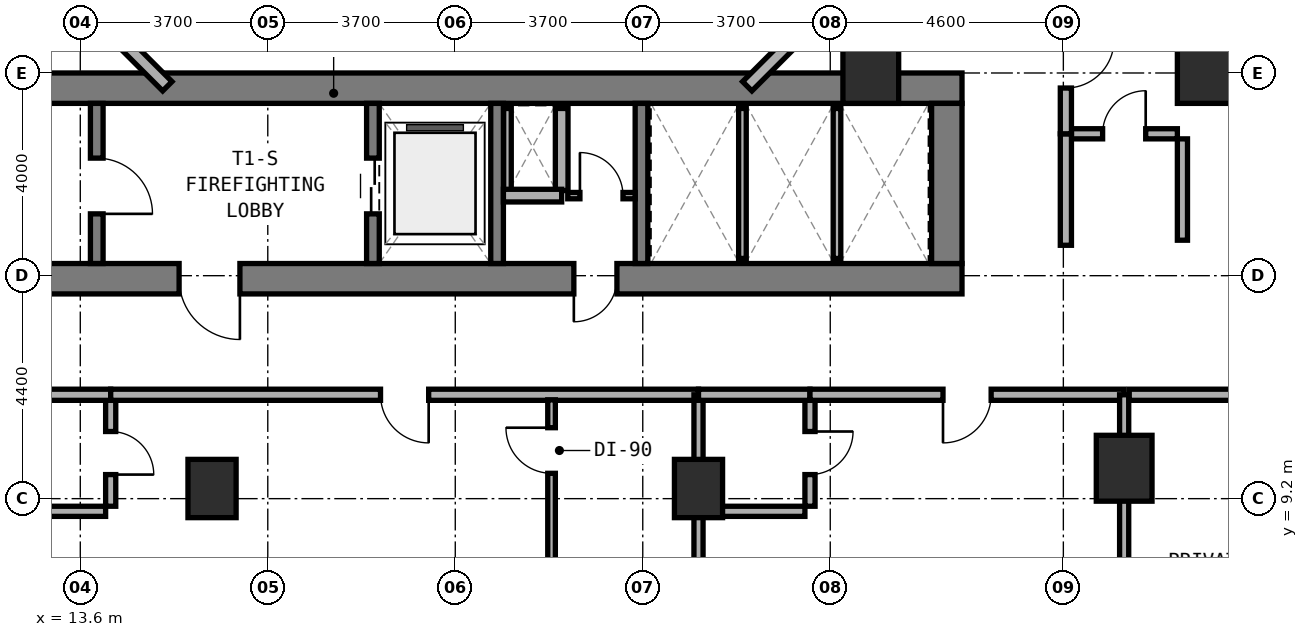
"""IFC4 building model, lengths in metres.
Left out: names, types, materials, properties, quantities, classifications, styles, units other than length and angle.
Written with IfcOpenShell. Run it as: python <this file> out.ifc"""

import sys

from ifc_helpers import new_model, si_unit, direction, frame, frame_2d, origin, origin_2d, place, context, subcontext, project, spatial, rectangle, extrude, element, fill, save


model = new_model("IFC4")
c1 = context("Model", 3, precision=1e-05, world=origin(), true_north=direction((0.0, 1.0)))
c2 = subcontext(c1, "Body", "Model", "MODEL_VIEW")
j1 = project(units=[si_unit("LENGTHUNIT", "METRE"), si_unit("PLANEANGLEUNIT", "RADIAN")], contexts=[c1])
p1 = place(None, origin())
s1 = spatial("IfcSite", under=j1, at=p1, CompositionType="ELEMENT")
p2 = place(p1, origin())
s2 = spatial("IfcBuilding", under=s1, at=p2, CompositionType="ELEMENT")
p3 = place(p2, frame((0.0, 0.0, 38.0)))
s3 = spatial("IfcBuildingStorey", under=s2, at=p3, CompositionType="ELEMENT", Elevation=38.0)
p4 = place(p3, frame((6.2, 13.54, 0.0), z_axis=(0.0, 0.0, 1.0), x_axis=(1.0, 0.0, 0.0)))
e1 = element("IfcWall", 1, at=p4, inside=s3, PredefinedType="SHEAR", context=c2, shape_type="SweptSolid", body=[
    extrude(rectangle(XDim=24.8, YDim=0.6, at=frame_2d((12.4, 0.0))), origin(), (0.0, 0.0, 1.0), 3.5),
])
p5 = place(p4, frame((9.35, 0.0, 0.0)))
e2 = element("IfcOpeningElement", 2, at=p5, cuts=e1, PredefinedType="OPENING", context=c2, shape_type="SweptSolid", body=[
    extrude(rectangle(XDim=1.2, YDim=2.15, at=frame_2d((0.6, 1.075))), frame((0.0, 0.31, 0.0), z_axis=(0.0, -1.0, 0.0), x_axis=(1.0, 0.0, 0.0)), (0.0, 0.0, 1.0), 0.62),
])
p6 = place(p4, frame((17.14, 0.0, 0.0)))
e3 = element("IfcOpeningElement", 3, at=p6, cuts=e1, PredefinedType="OPENING", context=c2, shape_type="SweptSolid", body=[
    extrude(rectangle(XDim=0.85, YDim=2.1, at=frame_2d((0.425, 1.05))), frame((0.0, 0.31, 0.0), z_axis=(0.0, -1.0, 0.0), x_axis=(1.0, 0.0, 0.0)), (0.0, 0.0, 1.0), 0.62),
])
p7 = place(p3, frame((6.2, 17.3, 0.0), z_axis=(0.0, 0.0, 1.0), x_axis=(1.0, 0.0, 0.0)))
e4 = element("IfcWall", 4, at=p7, inside=s3, PredefinedType="SHEAR", context=c2, shape_type="SweptSolid", body=[
    extrude(rectangle(XDim=24.8, YDim=0.6, at=frame_2d((12.4, 0.0))), origin(), (0.0, 0.0, 1.0), 3.5),
])
p8 = place(p3, frame((30.7, 13.84, 0.0), z_axis=(0.0, 0.0, 1.0), x_axis=(0.0, 1.0, 0.0)))
e5 = element("IfcWall", 5, at=p8, inside=s3, PredefinedType="SHEAR", context=c2, shape_type="SweptSolid", body=[
    extrude(rectangle(XDim=3.16, YDim=0.6, at=frame_2d((1.58, 0.0))), origin(), (0.0, 0.0, 1.0), 3.5),
])
p9 = place(p3, frame((13.925, 13.84, 0.0), z_axis=(0.0, 0.0, 1.0), x_axis=(0.0, 1.0, 0.0)))
e6 = element("IfcWall", 6, at=p9, inside=s3, PredefinedType="STANDARD", context=c2, shape_type="SweptSolid", body=[
    extrude(rectangle(XDim=3.16, YDim=0.25, at=frame_2d((1.58, 0.0))), origin(), (0.0, 0.0, 1.0), 3.22),
])
p10 = place(p9, frame((0.98, 0.0, 0.0)))
e7 = element("IfcOpeningElement", 7, at=p10, cuts=e6, PredefinedType="OPENING", context=c2, shape_type="SweptSolid", body=[
    extrude(rectangle(XDim=1.1, YDim=2.15, at=frame_2d((0.55, 1.075))), frame((0.0, 0.135, 0.0), z_axis=(0.0, -1.0, 0.0), x_axis=(1.0, 0.0, 0.0)), (0.0, 0.0, 1.0), 0.27),
])
p11 = place(p3, frame((19.375, 13.84, 0.0), z_axis=(0.0, 0.0, 1.0), x_axis=(0.0, 1.0, 0.0)))
e8 = element("IfcWall", 8, at=p11, inside=s3, PredefinedType="STANDARD", context=c2, shape_type="SweptSolid", body=[
    extrude(rectangle(XDim=3.16, YDim=0.25, at=frame_2d((1.58, 0.0))), origin(), (0.0, 0.0, 1.0), 3.22),
])
p12 = place(p11, frame((0.98, 0.0, 0.0)))
e9 = element("IfcOpeningElement", 9, at=p12, cuts=e8, PredefinedType="OPENING", context=c2, shape_type="SweptSolid", body=[
    extrude(rectangle(XDim=1.1, YDim=2.15, at=frame_2d((0.55, 1.075))), frame((0.0, 0.135, 0.0), z_axis=(0.0, -1.0, 0.0), x_axis=(1.0, 0.0, 0.0)), (0.0, 0.0, 1.0), 0.27),
])
for number, where, z_axis, x_axis in (
    (10, (21.825, 13.84, 0.0), (0.0, 0.0, 1.0), (0.0, 1.0, 0.0)),
    (11, (24.675, 13.84, 0.0), (0.0, 0.0, 1.0), (0.0, 1.0, 0.0)),
):
    element("IfcWall", number, at=place(p3, frame(where, z_axis=z_axis, x_axis=x_axis)), inside=s3, PredefinedType="STANDARD", context=c2, shape_type="SweptSolid", body=[
        extrude(rectangle(XDim=3.16, YDim=0.25, at=frame_2d((1.58, 0.0))), origin(), (0.0, 0.0, 1.0), 3.22),
    ])
for number, where, z_axis, x_axis in (
    (12, (16.2, 9.4, 0.0), (0.0, 0.0, 1.0), (1.0, 0.0, 0.0)),
    (13, (25.8, 9.4, 0.0), (0.0, 0.0, 1.0), (1.0, 0.0, 0.0)),
):
    element("IfcColumn", number, at=place(p3, frame(where, z_axis=z_axis, x_axis=x_axis)), inside=s3, PredefinedType="COLUMN", context=c2, shape_type="SweptSolid", body=[
        extrude(rectangle(XDim=0.95, YDim=1.15, at=origin_2d()), origin(), (0.0, 0.0, 1.0), 3.5),
    ])
for number, where, z_axis, x_axis in (
    (14, (34.2, 9.8, 0.0), (0.0, 0.0, 1.0), (1.0, 0.0, 0.0)),
    (15, (35.8, 17.65, 0.0), (0.0, 0.0, 1.0), (1.0, 0.0, 0.0)),
    (16, (29.2, 17.65, 0.0), (0.0, 0.0, 1.0), (1.0, 0.0, 0.0)),
):
    element("IfcColumn", number, at=place(p3, frame(where, z_axis=z_axis, x_axis=x_axis)), inside=s3, PredefinedType="COLUMN", context=c2, shape_type="SweptSolid", body=[
        extrude(rectangle(XDim=1.1, YDim=1.3, at=origin_2d()), origin(), (0.0, 0.0, 1.0), 3.5),
    ])
p13 = place(p3, frame((26.762, 17.338, 0.0), z_axis=(0.0, 0.0, 1.0), x_axis=(0.707059717605, 0.707153841636, 0.0)))
e17 = element("IfcWall", 17, at=p13, inside=s3, PredefinedType="STANDARD", context=c2, shape_type="SweptSolid", body=[
    extrude(rectangle(XDim=2.594, YDim=0.26, at=frame_2d((1.297, 0.0))), origin(), (0.0, 0.0, 1.0), 3.22),
])
p14 = place(p3, frame((13.484, 19.172, 0.0), z_axis=(0.0, 0.0, 1.0), x_axis=(0.707106781187, -0.707106781187, 0.0)))
e18 = element("IfcWall", 18, at=p14, inside=s3, PredefinedType="STANDARD", context=c2, shape_type="SweptSolid", body=[
    extrude(rectangle(XDim=2.594, YDim=0.26, at=frame_2d((1.297, 0.0))), origin(), (0.0, 0.0, 1.0), 3.22),
])
p15 = place(p3, frame((22.03, 15.28, 0.0), z_axis=(0.0, 0.0, 1.0), x_axis=(0.0, 1.0, 0.0)))
e19 = element("IfcWall", 19, at=p15, inside=s3, PredefinedType="PARTITIONING", context=c2, shape_type="SweptSolid", body=[
    extrude(rectangle(XDim=1.62, YDim=0.15, at=frame_2d((0.81, 0.0))), origin(), (0.0, 0.0, 1.0), 3.22),
])
p16 = place(p3, frame((23.1, 15.28, 0.0), z_axis=(0.0, 0.0, 1.0), x_axis=(0.0, 1.0, 0.0)))
e20 = element("IfcWall", 20, at=p16, inside=s3, PredefinedType="SOLIDWALL", context=c2, shape_type="SweptSolid", body=[
    extrude(rectangle(XDim=1.62, YDim=0.25, at=frame_2d((0.81, 0.0))), origin(), (0.0, 0.0, 1.0), 3.22),
])
p17 = place(p3, frame((21.95, 15.18, 0.0), z_axis=(0.0, 0.0, 1.0), x_axis=(1.0, 0.0, 0.0)))
e21 = element("IfcWall", 21, at=p17, inside=s3, PredefinedType="SOLIDWALL", context=c2, shape_type="SweptSolid", body=[
    extrude(rectangle(XDim=1.15, YDim=0.25, at=frame_2d((0.575, 0.0))), origin(), (0.0, 0.0, 1.0), 3.22),
])
p18 = place(p3, frame((23.22, 15.18, 0.0), z_axis=(0.0, 0.0, 1.0), x_axis=(1.0, 0.0, 0.0)))
e22 = element("IfcWall", 22, at=p18, inside=s3, PredefinedType="PARTITIONING", context=c2, shape_type="SweptSolid", body=[
    extrude(rectangle(XDim=1.33, YDim=0.125, at=frame_2d((0.665, 0.0))), origin(), (0.0, 0.0, 1.0), 3.22),
])
p19 = place(p18, frame((0.24, 0.0, 0.0)))
e23 = element("IfcOpeningElement", 23, at=p19, cuts=e22, PredefinedType="OPENING", context=c2, shape_type="SweptSolid", body=[
    extrude(rectangle(XDim=0.85, YDim=2.1, at=frame_2d((0.425, 1.05))), frame((0.0, 0.073, 0.0), z_axis=(0.0, -1.0, 0.0), x_axis=(1.0, 0.0, 0.0)), (0.0, 0.0, 1.0), 0.145),
])
p20 = place(p3, frame((26.667, 13.94, 0.0), z_axis=(0.0, 0.0, 1.0), x_axis=(0.0, 1.0, 0.0)))
e24 = element("IfcWall", 24, at=p20, inside=s3, PredefinedType="PARTITIONING", context=c2, shape_type="SweptSolid", body=[
    extrude(rectangle(XDim=2.96, YDim=0.15, at=frame_2d((1.48, 0.0))), origin(), (0.0, 0.0, 1.0), 3.22),
])
p21 = place(p3, frame((28.533, 13.94, 0.0), z_axis=(0.0, 0.0, 1.0), x_axis=(0.0, 1.0, 0.0)))
e25 = element("IfcWall", 25, at=p21, inside=s3, PredefinedType="PARTITIONING", context=c2, shape_type="SweptSolid", body=[
    extrude(rectangle(XDim=2.96, YDim=0.15, at=frame_2d((1.48, 0.0))), origin(), (0.0, 0.0, 1.0), 2.395),
])
p22 = place(p3, frame((14.2, 9.05, 0.0), z_axis=(0.0, 0.0, 1.0), x_axis=(0.0, 1.0, 0.0)))
e26 = element("IfcWall", 26, at=p22, inside=s3, PredefinedType="PLUMBINGWALL", context=c2, shape_type="SweptSolid", body=[
    extrude(rectangle(XDim=2.1, YDim=0.2, at=frame_2d((1.05, 0.0))), origin(), (0.0, 0.0, 1.0), 2.745),
])
p23 = place(p22, frame((0.625, 0.0, 0.0)))
e27 = element("IfcOpeningElement", 27, at=p23, cuts=e26, PredefinedType="OPENING", context=c2, shape_type="SweptSolid", body=[
    extrude(rectangle(XDim=0.85, YDim=2.1, at=frame_2d((0.425, 1.05))), frame((0.0, 0.11, 0.0), z_axis=(0.0, -1.0, 0.0), x_axis=(1.0, 0.0, 0.0)), (0.0, 0.0, 1.0), 0.22),
])
p24 = place(p3, frame((12.1, 8.95, 0.0), z_axis=(0.0, 0.0, 1.0), x_axis=(1.0, 0.0, 0.0)))
e28 = element("IfcWall", 28, at=p24, inside=s3, PredefinedType="PLUMBINGWALL", context=c2, shape_type="SweptSolid", body=[
    extrude(rectangle(XDim=2.0, YDim=0.2, at=frame_2d((1.0, 0.0))), origin(), (0.0, 0.0, 1.0), 3.22),
])
p25 = place(p3, frame((12.0, 11.25, 0.0), z_axis=(0.0, 0.0, 1.0), x_axis=(1.0, 0.0, 0.0)))
e29 = element("IfcWall", 29, at=p25, inside=s3, PredefinedType="SOLIDWALL", context=c2, shape_type="SweptSolid", body=[
    extrude(rectangle(XDim=2.2, YDim=0.22, at=frame_2d((1.1, 0.0))), origin(), (0.0, 0.0, 1.0), 2.865),
])
p26 = place(p3, frame((14.2, 11.25, 0.0), z_axis=(0.0, 0.0, 1.0), x_axis=(1.0, 0.0, 0.0)))
e30 = element("IfcWall", 30, at=p26, inside=s3, PredefinedType="SOLIDWALL", context=c2, shape_type="SweptSolid", body=[
    extrude(rectangle(XDim=11.6, YDim=0.22, at=frame_2d((5.8, 0.0))), origin(), (0.0, 0.0, 1.0), 2.395),
])
p27 = place(p26, frame((5.325, 0.0, 0.0)))
e31 = element("IfcOpeningElement", 31, at=p27, cuts=e30, PredefinedType="OPENING", context=c2, shape_type="SweptSolid", body=[
    extrude(rectangle(XDim=0.95, YDim=2.1, at=frame_2d((0.475, 1.05))), frame((0.0, 0.12, 0.0), z_axis=(0.0, -1.0, 0.0), x_axis=(1.0, 0.0, 0.0)), (0.0, 0.0, 1.0), 0.24),
])
p28 = place(p3, frame((22.9, 3.16, 0.0), z_axis=(0.0, 0.0, 1.0), x_axis=(0.0, 1.0, 0.0)))
e32 = element("IfcWall", 32, at=p28, inside=s3, PredefinedType="PARTITIONING", context=c2, shape_type="SweptSolid", body=[
    extrude(rectangle(XDim=7.99, YDim=0.15, at=frame_2d((3.995, 0.0))), origin(), (0.0, 0.0, 1.0), 2.745),
])
p29 = place(p28, frame((6.54, 0.0, 0.0)))
e33 = element("IfcOpeningElement", 33, at=p29, cuts=e32, PredefinedType="OPENING", context=c2, shape_type="SweptSolid", body=[
    extrude(rectangle(XDim=0.9, YDim=2.1, at=frame_2d((0.45, 1.05))), frame((0.0, 0.085, 0.0), z_axis=(0.0, -1.0, 0.0), x_axis=(1.0, 0.0, 0.0)), (0.0, 0.0, 1.0), 0.17),
])
p30 = place(p3, frame((25.8, 3.06, 0.0), z_axis=(0.0, 0.0, 1.0), x_axis=(0.0, 1.0, 0.0)))
e34 = element("IfcWall", 34, at=p30, inside=s3, PredefinedType="SOLIDWALL", context=c2, shape_type="SweptSolid", body=[
    extrude(rectangle(XDim=8.19, YDim=0.18, at=frame_2d((4.095, 0.0))), origin(), (0.0, 0.0, 1.0), 2.395),
])
p31 = place(p3, frame((28.0, 9.05, 0.0), z_axis=(0.0, 0.0, 1.0), x_axis=(0.0, 1.0, 0.0)))
e35 = element("IfcWall", 35, at=p31, inside=s3, PredefinedType="PLUMBINGWALL", context=c2, shape_type="SweptSolid", body=[
    extrude(rectangle(XDim=2.1, YDim=0.2, at=frame_2d((1.05, 0.0))), origin(), (0.0, 0.0, 1.0), 2.745),
])
p32 = place(p31, frame((0.625, 0.0, 0.0)))
e36 = element("IfcOpeningElement", 36, at=p32, cuts=e35, PredefinedType="OPENING", context=c2, shape_type="SweptSolid", body=[
    extrude(rectangle(XDim=0.85, YDim=2.1, at=frame_2d((0.425, 1.05))), frame((0.0, 0.11, 0.0), z_axis=(0.0, -1.0, 0.0), x_axis=(1.0, 0.0, 0.0)), (0.0, 0.0, 1.0), 0.22),
])
p33 = place(p3, frame((25.9, 8.95, 0.0), z_axis=(0.0, 0.0, 1.0), x_axis=(1.0, 0.0, 0.0)))
e37 = element("IfcWall", 37, at=p33, inside=s3, PredefinedType="PLUMBINGWALL", context=c2, shape_type="SweptSolid", body=[
    extrude(rectangle(XDim=2.0, YDim=0.2, at=frame_2d((1.0, 0.0))), origin(), (0.0, 0.0, 1.0), 3.22),
])
p34 = place(p3, frame((25.8, 11.25, 0.0), z_axis=(0.0, 0.0, 1.0), x_axis=(1.0, 0.0, 0.0)))
e38 = element("IfcWall", 38, at=p34, inside=s3, PredefinedType="SOLIDWALL", context=c2, shape_type="SweptSolid", body=[
    extrude(rectangle(XDim=2.2, YDim=0.22, at=frame_2d((1.1, 0.0))), origin(), (0.0, 0.0, 1.0), 2.395),
])
p35 = place(p3, frame((28.0, 11.25, 0.0), z_axis=(0.0, 0.0, 1.0), x_axis=(1.0, 0.0, 0.0)))
e39 = element("IfcWall", 39, at=p35, inside=s3, PredefinedType="SOLIDWALL", context=c2, shape_type="SweptSolid", body=[
    extrude(rectangle(XDim=6.2, YDim=0.22, at=frame_2d((3.1, 0.0))), origin(), (0.0, 0.0, 1.0), 2.395),
])
p36 = place(p35, frame((2.625, 0.0, 0.0)))
e40 = element("IfcOpeningElement", 40, at=p36, cuts=e39, PredefinedType="OPENING", context=c2, shape_type="SweptSolid", body=[
    extrude(rectangle(XDim=0.95, YDim=2.1, at=frame_2d((0.475, 1.05))), frame((0.0, 0.12, 0.0), z_axis=(0.0, -1.0, 0.0), x_axis=(1.0, 0.0, 0.0)), (0.0, 0.0, 1.0), 0.24),
])
p37 = place(p3, frame((34.2, 4.576, 0.0), z_axis=(0.0, 0.0, 1.0), x_axis=(0.0, 1.0, 0.0)))
e41 = element("IfcWall", 41, at=p37, inside=s3, PredefinedType="SOLIDWALL", context=c2, shape_type="SweptSolid", body=[
    extrude(rectangle(XDim=6.674, YDim=0.18, at=frame_2d((3.337, 0.0))), origin(), (0.0, 0.0, 1.0), 2.395),
])
p38 = place(p3, frame((34.3, 11.25, 0.0), z_axis=(0.0, 0.0, 1.0), x_axis=(1.0, 0.0, 0.0)))
e42 = element("IfcWall", 42, at=p38, inside=s3, PredefinedType="SOLIDWALL", context=c2, shape_type="SweptSolid", body=[
    extrude(rectangle(XDim=7.44, YDim=0.22, at=frame_2d((3.72, 0.0))), origin(), (0.0, 0.0, 1.0), 2.745),
])
p39 = place(p38, frame((2.911, 0.0, 0.0)))
e43 = element("IfcOpeningElement", 43, at=p39, cuts=e42, PredefinedType="OPENING", context=c2, shape_type="SweptSolid", body=[
    extrude(rectangle(XDim=0.95, YDim=2.1, at=frame_2d((0.475, 1.05))), frame((0.0, 0.12, 0.0), z_axis=(0.0, -1.0, 0.0), x_axis=(1.0, 0.0, 0.0)), (0.0, 0.0, 1.0), 0.24),
])
p40 = place(p3, frame((33.15, 16.4, 0.0), z_axis=(0.0, 0.0, 1.0), x_axis=(1.0, 0.0, 0.0)))
e44 = element("IfcWall", 44, at=p40, inside=s3, PredefinedType="PLUMBINGWALL", context=c2, shape_type="SweptSolid", body=[
    extrude(rectangle(XDim=2.1, YDim=0.2, at=frame_2d((1.05, 0.0))), origin(), (0.0, 0.0, 1.0), 3.22),
])
p41 = place(p40, frame((0.625, 0.0, 0.0)))
e45 = element("IfcOpeningElement", 45, at=p41, cuts=e44, PredefinedType="OPENING", context=c2, shape_type="SweptSolid", body=[
    extrude(rectangle(XDim=0.85, YDim=2.1, at=frame_2d((0.425, 1.05))), frame((0.0, 0.11, 0.0), z_axis=(0.0, -1.0, 0.0), x_axis=(1.0, 0.0, 0.0)), (0.0, 0.0, 1.0), 0.22),
])
p42 = place(p3, frame((35.35, 14.3, 0.0), z_axis=(0.0, 0.0, 1.0), x_axis=(0.0, 1.0, 0.0)))
e46 = element("IfcWall", 46, at=p42, inside=s3, PredefinedType="PLUMBINGWALL", context=c2, shape_type="SweptSolid", body=[
    extrude(rectangle(XDim=2.0, YDim=0.2, at=frame_2d((1.0, 0.0))), origin(), (0.0, 0.0, 1.0), 2.745),
])
p43 = place(p3, frame((33.05, 14.2, 0.0), z_axis=(0.0, 0.0, 1.0), x_axis=(0.0, 1.0, 0.0)))
e47 = element("IfcWall", 47, at=p43, inside=s3, PredefinedType="SOLIDWALL", context=c2, shape_type="SweptSolid", body=[
    extrude(rectangle(XDim=2.2, YDim=0.22, at=frame_2d((1.1, 0.0))), origin(), (0.0, 0.0, 1.0), 3.22),
])
p44 = place(p3, frame((33.05, 16.4, 0.0), z_axis=(0.0, 0.0, 1.0), x_axis=(0.0, 1.0, 0.0)))
e48 = element("IfcWall", 48, at=p44, inside=s3, PredefinedType="SOLIDWALL", context=c2, shape_type="SweptSolid", body=[
    extrude(rectangle(XDim=2.756, YDim=0.22, at=frame_2d((1.378, 0.0))), origin(), (0.0, 0.0, 1.0), 2.395),
])
p45 = place(p44, frame((0.903, 0.0, 0.0)))
e49 = element("IfcOpeningElement", 49, at=p45, cuts=e48, PredefinedType="OPENING", context=c2, shape_type="SweptSolid", body=[
    extrude(rectangle(XDim=0.95, YDim=2.1, at=frame_2d((0.475, 1.05))), frame((0.0, 0.12, 0.0), z_axis=(0.0, -1.0, 0.0), x_axis=(1.0, 0.0, 0.0)), (0.0, 0.0, 1.0), 0.24),
])
p46 = place(p10, frame((1.1, 0.0, 0.0), z_axis=(0.0, 0.0, 1.0), x_axis=(-1.0, 0.0, 0.0)))
e50 = element("IfcDoor", 50, at=p46, inside=s3, OperationType="SINGLE_SWING_RIGHT", PredefinedType="DOOR", context=c2, shape_type="SweptSolid", body=[
    extrude(rectangle(XDim=1.1, YDim=2.15, at=frame_2d((0.55, 1.075))), frame((0.0, 0.025, 0.0), z_axis=(0.0, -1.0, 0.0), x_axis=(1.0, 0.0, 0.0)), (0.0, 0.0, 1.0), 0.05),
])
fill(e7, e50)
p47 = place(p5, frame((1.2, 0.0, 0.0), z_axis=(0.0, 0.0, 1.0), x_axis=(-1.0, 0.0, 0.0)))
e51 = element("IfcDoor", 51, at=p47, inside=s3, OperationType="SINGLE_SWING_LEFT", PredefinedType="DOOR", context=c2, shape_type="SweptSolid", body=[
    extrude(rectangle(XDim=1.2, YDim=2.15, at=frame_2d((0.6, 1.075))), frame((0.0, 0.025, 0.0), z_axis=(0.0, -1.0, 0.0), x_axis=(1.0, 0.0, 0.0)), (0.0, 0.0, 1.0), 0.05),
])
fill(e2, e51)
p48 = place(p12, origin())
e52 = element("IfcDoor", 52, at=p48, inside=s3, OperationType="DOUBLE_DOOR_SLIDING", PredefinedType="DOOR", context=c2, shape_type="SweptSolid", body=[
    extrude(rectangle(XDim=1.1, YDim=2.15, at=frame_2d((0.55, 1.075))), frame((0.0, 0.025, 0.0), z_axis=(0.0, -1.0, 0.0), x_axis=(1.0, 0.0, 0.0)), (0.0, 0.0, 1.0), 0.05),
])
fill(e9, e52)
p49 = place(p6, frame((0.85, 0.0, 0.0), z_axis=(0.0, 0.0, 1.0), x_axis=(-1.0, 0.0, 0.0)))
e53 = element("IfcDoor", 53, at=p49, inside=s3, OperationType="SINGLE_SWING_RIGHT", PredefinedType="DOOR", context=c2, shape_type="SweptSolid", body=[
    extrude(rectangle(XDim=0.85, YDim=2.1, at=frame_2d((0.425, 1.05))), frame((0.0, 0.025, 0.0), z_axis=(0.0, -1.0, 0.0), x_axis=(1.0, 0.0, 0.0)), (0.0, 0.0, 1.0), 0.05),
])
fill(e3, e53)
p50 = place(p19, origin())
e54 = element("IfcDoor", 54, at=p50, inside=s3, OperationType="SINGLE_SWING_LEFT", PredefinedType="DOOR", context=c2, shape_type="SweptSolid", body=[
    extrude(rectangle(XDim=0.85, YDim=2.1, at=frame_2d((0.425, 1.05))), frame((0.0, 0.025, 0.0), z_axis=(0.0, -1.0, 0.0), x_axis=(1.0, 0.0, 0.0)), (0.0, 0.0, 1.0), 0.05),
])
fill(e23, e54)
p51 = place(p23, frame((0.85, 0.0, 0.0), z_axis=(0.0, 0.0, 1.0), x_axis=(-1.0, 0.0, 0.0)))
e55 = element("IfcDoor", 55, at=p51, inside=s3, OperationType="SINGLE_SWING_RIGHT", PredefinedType="DOOR", context=c2, shape_type="SweptSolid", body=[
    extrude(rectangle(XDim=0.85, YDim=2.1, at=frame_2d((0.425, 1.05))), frame((0.0, 0.025, 0.0), z_axis=(0.0, -1.0, 0.0), x_axis=(1.0, 0.0, 0.0)), (0.0, 0.0, 1.0), 0.05),
])
fill(e27, e55)
p52 = place(p27, frame((0.95, 0.0, 0.0), z_axis=(0.0, 0.0, 1.0), x_axis=(-1.0, 0.0, 0.0)))
e56 = element("IfcDoor", 56, at=p52, inside=s3, OperationType="SINGLE_SWING_LEFT", PredefinedType="DOOR", context=c2, shape_type="SweptSolid", body=[
    extrude(rectangle(XDim=0.95, YDim=2.1, at=frame_2d((0.475, 1.05))), frame((0.0, 0.025, 0.0), z_axis=(0.0, -1.0, 0.0), x_axis=(1.0, 0.0, 0.0)), (0.0, 0.0, 1.0), 0.05),
])
fill(e31, e56)
p53 = place(p29, origin())
e57 = element("IfcDoor", 57, at=p53, inside=s3, OperationType="SINGLE_SWING_RIGHT", PredefinedType="DOOR", context=c2, shape_type="SweptSolid", body=[
    extrude(rectangle(XDim=0.9, YDim=2.1, at=frame_2d((0.45, 1.05))), frame((0.0, 0.025, 0.0), z_axis=(0.0, -1.0, 0.0), x_axis=(1.0, 0.0, 0.0)), (0.0, 0.0, 1.0), 0.05),
])
fill(e33, e57)
p54 = place(p32, frame((0.85, 0.0, 0.0), z_axis=(0.0, 0.0, 1.0), x_axis=(-1.0, 0.0, 0.0)))
e58 = element("IfcDoor", 58, at=p54, inside=s3, OperationType="SINGLE_SWING_LEFT", PredefinedType="DOOR", context=c2, shape_type="SweptSolid", body=[
    extrude(rectangle(XDim=0.85, YDim=2.1, at=frame_2d((0.425, 1.05))), frame((0.0, 0.025, 0.0), z_axis=(0.0, -1.0, 0.0), x_axis=(1.0, 0.0, 0.0)), (0.0, 0.0, 1.0), 0.05),
])
fill(e36, e58)
p55 = place(p36, frame((0.95, 0.0, 0.0), z_axis=(0.0, 0.0, 1.0), x_axis=(-1.0, 0.0, 0.0)))
e59 = element("IfcDoor", 59, at=p55, inside=s3, OperationType="SINGLE_SWING_RIGHT", PredefinedType="DOOR", context=c2, shape_type="SweptSolid", body=[
    extrude(rectangle(XDim=0.95, YDim=2.1, at=frame_2d((0.475, 1.05))), frame((0.0, 0.025, 0.0), z_axis=(0.0, -1.0, 0.0), x_axis=(1.0, 0.0, 0.0)), (0.0, 0.0, 1.0), 0.05),
])
fill(e40, e59)
p56 = place(p41, origin())
e60 = element("IfcDoor", 60, at=p56, inside=s3, OperationType="SINGLE_SWING_RIGHT", PredefinedType="DOOR", context=c2, shape_type="SweptSolid", body=[
    extrude(rectangle(XDim=0.85, YDim=2.1, at=frame_2d((0.425, 1.05))), frame((0.0, 0.025, 0.0), z_axis=(0.0, -1.0, 0.0), x_axis=(1.0, 0.0, 0.0)), (0.0, 0.0, 1.0), 0.05),
])
fill(e45, e60)
p57 = place(p45, frame((0.95, 0.0, 0.0), z_axis=(0.0, 0.0, 1.0), x_axis=(-1.0, 0.0, 0.0)))
e61 = element("IfcDoor", 61, at=p57, inside=s3, OperationType="SINGLE_SWING_LEFT", PredefinedType="DOOR", context=c2, shape_type="SweptSolid", body=[
    extrude(rectangle(XDim=0.95, YDim=2.1, at=frame_2d((0.475, 1.05))), frame((0.0, 0.025, 0.0), z_axis=(0.0, -1.0, 0.0), x_axis=(1.0, 0.0, 0.0)), (0.0, 0.0, 1.0), 0.05),
])
fill(e49, e61)
save(model, sys.argv[1])
